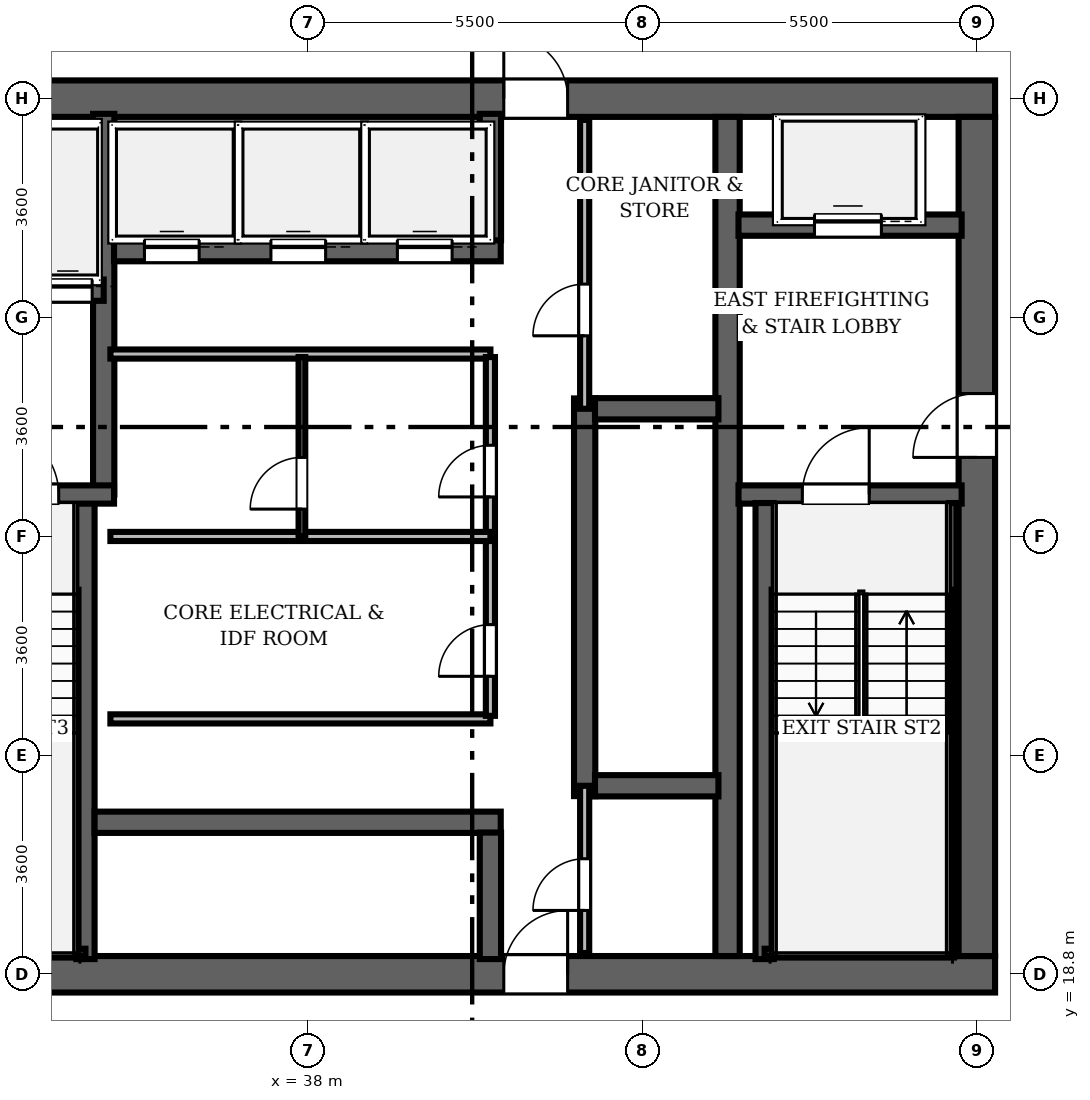
"""IFC4 building model, lengths in metres.
Left out: names, types, materials, properties, quantities, classifications, styles, units other than length and angle.
Written with IfcOpenShell. Run it as: python <this file> out.ifc"""

import sys

from ifc_helpers import new_model, si_unit, direction, frame, frame_2d, origin, place, context, subcontext, project, spatial, rectangle, extrude, element, fill, save


model = new_model("IFC4")
c1 = context("Model", 3, precision=1e-05, world=origin(), true_north=direction((0.0, 1.0)))
c2 = subcontext(c1, "Body", "Model", "MODEL_VIEW")
j1 = project(units=[si_unit("LENGTHUNIT", "METRE"), si_unit("PLANEANGLEUNIT", "RADIAN")], contexts=[c1])
p1 = place(None, origin())
s1 = spatial("IfcSite", under=j1, at=p1, CompositionType="ELEMENT")
p2 = place(p1, origin())
s2 = spatial("IfcBuilding", under=s1, at=p2, CompositionType="ELEMENT")
p3 = place(p2, frame((0.0, 0.0, 35.4)))
s3 = spatial("IfcBuildingStorey", under=s2, at=p3, CompositionType="ELEMENT", Elevation=35.4)
p4 = place(p3, frame((26.7, 18.8, 0.0), z_axis=(0.0, 0.0, 1.0), x_axis=(1.0, 0.0, 0.0)))
e1 = element("IfcWall", 1, at=p4, inside=s3, PredefinedType="SHEAR", context=c2, shape_type="SweptSolid", body=[
    extrude(rectangle(XDim=22.6, YDim=0.6, at=frame_2d((11.3, 0.0))), origin(), (0.0, 0.0, 1.0), 6.0),
])
p5 = place(p4, frame((14.52, 0.0, 0.0)))
e2 = element("IfcOpeningElement", 2, at=p5, cuts=e1, PredefinedType="OPENING", context=c2, shape_type="SweptSolid", body=[
    extrude(rectangle(XDim=1.05, YDim=2.15, at=frame_2d((0.525, 1.075))), frame((0.0, 0.31, 0.0), z_axis=(0.0, -1.0, 0.0), x_axis=(1.0, 0.0, 0.0)), (0.0, 0.0, 1.0), 0.62),
])
p6 = place(p3, frame((26.7, 33.2, 0.0), z_axis=(0.0, 0.0, 1.0), x_axis=(1.0, 0.0, 0.0)))
e3 = element("IfcWall", 3, at=p6, inside=s3, PredefinedType="SHEAR", context=c2, shape_type="SweptSolid", body=[
    extrude(rectangle(XDim=22.6, YDim=0.6, at=frame_2d((11.3, 0.0))), origin(), (0.0, 0.0, 1.0), 6.0),
])
p7 = place(p6, frame((4.62, 0.0, 0.0)))
e4 = element("IfcOpeningElement", 4, at=p7, cuts=e3, PredefinedType="OPENING", context=c2, shape_type="SweptSolid", body=[
    extrude(rectangle(XDim=1.05, YDim=2.15, at=frame_2d((0.525, 1.075))), frame((0.0, 0.31, 0.0), z_axis=(0.0, -1.0, 0.0), x_axis=(1.0, 0.0, 0.0)), (0.0, 0.0, 1.0), 0.62),
])
p8 = place(p6, frame((14.52, 0.0, 0.0)))
e5 = element("IfcOpeningElement", 5, at=p8, cuts=e3, PredefinedType="OPENING", context=c2, shape_type="SweptSolid", body=[
    extrude(rectangle(XDim=1.05, YDim=2.15, at=frame_2d((0.525, 1.075))), frame((0.0, 0.31, 0.0), z_axis=(0.0, -1.0, 0.0), x_axis=(1.0, 0.0, 0.0)), (0.0, 0.0, 1.0), 0.62),
])
p9 = place(p3, frame((49.0, 19.1, 0.0), z_axis=(0.0, 0.0, 1.0), x_axis=(0.0, 1.0, 0.0)))
e6 = element("IfcWall", 6, at=p9, inside=s3, PredefinedType="SHEAR", context=c2, shape_type="SweptSolid", body=[
    extrude(rectangle(XDim=13.8, YDim=0.6, at=frame_2d((6.9, 0.0))), origin(), (0.0, 0.0, 1.0), 6.0),
])
p10 = place(p9, frame((8.2, 0.0, 0.0)))
e7 = element("IfcOpeningElement", 7, at=p10, cuts=e6, PredefinedType="OPENING", context=c2, shape_type="SweptSolid", body=[
    extrude(rectangle(XDim=1.05, YDim=2.15, at=frame_2d((0.525, 1.075))), frame((0.0, 0.31, 0.0), z_axis=(0.0, -1.0, 0.0), x_axis=(1.0, 0.0, 0.0)), (0.0, 0.0, 1.0), 0.62),
])
p11 = place(p3, frame((44.9, 19.1, 0.0), z_axis=(0.0, 0.0, 1.0), x_axis=(0.0, 1.0, 0.0)))
e8 = element("IfcWall", 8, at=p11, inside=s3, PredefinedType="SHEAR", context=c2, shape_type="SweptSolid", body=[
    extrude(rectangle(XDim=13.8, YDim=0.4, at=frame_2d((6.9, 0.0))), origin(), (0.0, 0.0, 1.0), 6.0),
])
p12 = place(p3, frame((45.08, 26.69, 0.0), z_axis=(0.0, 0.0, 1.0), x_axis=(1.0, 0.0, 0.0)))
e9 = element("IfcWall", 9, at=p12, inside=s3, PredefinedType="SHEAR", context=c2, shape_type="SweptSolid", body=[
    extrude(rectangle(XDim=3.67, YDim=0.3, at=frame_2d((1.835, 0.0))), origin(), (0.0, 0.0, 1.0), 6.0),
])
p13 = place(p12, frame((1.05, 0.0, 0.0)))
e10 = element("IfcOpeningElement", 10, at=p13, cuts=e9, PredefinedType="OPENING", context=c2, shape_type="SweptSolid", body=[
    extrude(rectangle(XDim=1.1, YDim=2.15, at=frame_2d((0.55, 1.075))), frame((0.0, 0.16, 0.0), z_axis=(0.0, -1.0, 0.0), x_axis=(1.0, 0.0, 0.0)), (0.0, 0.0, 1.0), 0.32),
])
p14 = place(p3, frame((45.51, 19.05, 0.0), z_axis=(0.0, 0.0, 1.0), x_axis=(0.0, 1.0, 0.0)))
e11 = element("IfcWall", 11, at=p14, inside=s3, PredefinedType="SHEAR", context=c2, shape_type="SweptSolid", body=[
    extrude(rectangle(XDim=7.5, YDim=0.3, at=frame_2d((3.75, 0.0))), origin(), (0.0, 0.0, 1.0), 6.0),
])
p15 = place(p3, frame((48.605, 19.1, 0.0), z_axis=(0.0, 0.0, 1.0), x_axis=(0.0, 1.0, 0.0)))
e12 = element("IfcWall", 12, at=p15, inside=s3, PredefinedType="SHEAR", context=c2, shape_type="SweptSolid", body=[
    extrude(rectangle(XDim=7.45, YDim=0.12, at=frame_2d((3.725, 0.0))), origin(), (0.0, 0.0, 1.0), 6.0),
])
p16 = place(p3, frame((45.51, 19.16, 0.0), z_axis=(0.0, 0.0, 1.0), x_axis=(1.0, 0.0, 0.0)))
e13 = element("IfcWall", 13, at=p16, inside=s3, PredefinedType="SHEAR", context=c2, shape_type="SweptSolid", body=[
    extrude(rectangle(XDim=3.095, YDim=0.12, at=frame_2d((1.547, 0.0))), origin(), (0.0, 0.0, 1.0), 6.0),
])
p17 = place(p3, frame((45.08, 31.12, 0.0), z_axis=(0.0, 0.0, 1.0), x_axis=(1.0, 0.0, 0.0)))
e14 = element("IfcWall", 14, at=p17, inside=s3, PredefinedType="SHEAR", context=c2, shape_type="SweptSolid", body=[
    extrude(rectangle(XDim=3.67, YDim=0.35, at=frame_2d((1.835, 0.0))), origin(), (0.0, 0.0, 1.0), 4.81),
])
p18 = place(p17, frame((1.25, 0.0, 0.0)))
e15 = element("IfcOpeningElement", 15, at=p18, cuts=e14, PredefinedType="OPENING", context=c2, shape_type="SweptSolid", body=[
    extrude(rectangle(XDim=1.1, YDim=2.15, at=frame_2d((0.55, 1.075))), frame((0.0, 0.185, 0.0), z_axis=(0.0, -1.0, 0.0), x_axis=(1.0, 0.0, 0.0)), (0.0, 0.0, 1.0), 0.37),
])
p19 = place(p3, frame((34.34, 19.05, 0.0), z_axis=(0.0, 0.0, 1.0), x_axis=(0.0, 1.0, 0.0)))
e16 = element("IfcWall", 16, at=p19, inside=s3, PredefinedType="SHEAR", context=c2, shape_type="SweptSolid", body=[
    extrude(rectangle(XDim=7.5, YDim=0.3, at=frame_2d((3.75, 0.0))), origin(), (0.0, 0.0, 1.0), 6.0),
])
p20 = place(p3, frame((34.64, 26.69, 0.0), z_axis=(0.0, 0.0, 1.0), x_axis=(0.0, 1.0, 0.0)))
e17 = element("IfcWall", 17, at=p20, inside=s3, PredefinedType="SHEAR", context=c2, shape_type="SweptSolid", body=[
    extrude(rectangle(XDim=6.26, YDim=0.35, at=frame_2d((3.13, 0.0))), origin(), (0.0, 0.0, 1.0), 6.0),
])
p21 = place(p3, frame((31.25, 26.69, 0.0), z_axis=(0.0, 0.0, 1.0), x_axis=(1.0, 0.0, 0.0)))
e18 = element("IfcWall", 18, at=p21, inside=s3, PredefinedType="SHEAR", context=c2, shape_type="SweptSolid", body=[
    extrude(rectangle(XDim=3.56, YDim=0.3, at=frame_2d((1.78, 0.0))), origin(), (0.0, 0.0, 1.0), 6.0),
])
p22 = place(p21, frame((1.55, 0.0, 0.0)))
e19 = element("IfcOpeningElement", 19, at=p22, cuts=e18, PredefinedType="OPENING", context=c2, shape_type="SweptSolid", body=[
    extrude(rectangle(XDim=1.1, YDim=2.15, at=frame_2d((0.55, 1.075))), frame((0.0, 0.16, 0.0), z_axis=(0.0, -1.0, 0.0), x_axis=(1.0, 0.0, 0.0)), (0.0, 0.0, 1.0), 0.32),
])
p23 = place(p3, frame((31.3, 19.16, 0.0), z_axis=(0.0, 0.0, 1.0), x_axis=(1.0, 0.0, 0.0)))
e20 = element("IfcWall", 20, at=p23, inside=s3, PredefinedType="SHEAR", context=c2, shape_type="SweptSolid", body=[
    extrude(rectangle(XDim=3.04, YDim=0.12, at=frame_2d((1.52, 0.0))), origin(), (0.0, 0.0, 1.0), 6.0),
])
p24 = place(p3, frame((32.23, 30.05, 0.0), z_axis=(0.0, 0.0, 1.0), x_axis=(1.0, 0.0, 0.0)))
e21 = element("IfcWall", 21, at=p24, inside=s3, PredefinedType="SHEAR", context=c2, shape_type="SweptSolid", body=[
    extrude(rectangle(XDim=2.41, YDim=0.35, at=frame_2d((1.205, 0.0))), origin(), (0.0, 0.0, 1.0), 4.81),
])
p25 = place(p24, frame((0.42, 0.0, 0.0)))
e22 = element("IfcOpeningElement", 22, at=p25, cuts=e21, PredefinedType="OPENING", context=c2, shape_type="SweptSolid", body=[
    extrude(rectangle(XDim=0.8, YDim=2.15, at=frame_2d((0.4, 1.075))), frame((0.0, 0.185, 0.0), z_axis=(0.0, -1.0, 0.0), x_axis=(1.0, 0.0, 0.0)), (0.0, 0.0, 1.0), 0.37),
])
p26 = place(p24, frame((1.42, 0.0, 0.0)))
e23 = element("IfcOpeningElement", 23, at=p26, cuts=e21, PredefinedType="OPENING", context=c2, shape_type="SweptSolid", body=[
    extrude(rectangle(XDim=0.8, YDim=2.15, at=frame_2d((0.4, 1.075))), frame((0.0, 0.185, 0.0), z_axis=(0.0, -1.0, 0.0), x_axis=(1.0, 0.0, 0.0)), (0.0, 0.0, 1.0), 0.37),
])
p27 = place(p3, frame((42.55, 21.73, 0.0), z_axis=(0.0, 0.0, 1.0), x_axis=(0.0, 1.0, 0.0)))
e24 = element("IfcWall", 24, at=p27, inside=s3, PredefinedType="SHEAR", context=c2, shape_type="SweptSolid", body=[
    extrude(rectangle(XDim=6.54, YDim=0.35, at=frame_2d((3.27, 0.0))), origin(), (0.0, 0.0, 1.0), 4.81),
])
for number, where, z_axis, x_axis in (
    (25, (42.72, 21.9, 0.0), (0.0, 0.0, 1.0), (1.0, 0.0, 0.0)),
    (26, (42.72, 28.1, 0.0), (0.0, 0.0, 1.0), (1.0, 0.0, 0.0)),
):
    element("IfcWall", number, at=place(p3, frame(where, z_axis=z_axis, x_axis=x_axis)), inside=s3, PredefinedType="SHEAR", context=c2, shape_type="SweptSolid", body=[
        extrude(rectangle(XDim=2.03, YDim=0.35, at=frame_2d((1.015, 0.0))), origin(), (0.0, 0.0, 1.0), 4.81),
    ])
p28 = place(p3, frame((34.81, 30.7, 0.0), z_axis=(0.0, 0.0, 1.0), x_axis=(1.0, 0.0, 0.0)))
e27 = element("IfcWall", 27, at=p28, inside=s3, PredefinedType="SHEAR", context=c2, shape_type="SweptSolid", body=[
    extrude(rectangle(XDim=6.36, YDim=0.35, at=frame_2d((3.18, 0.0))), origin(), (0.0, 0.0, 1.0), 4.81),
])
p29 = place(p28, frame((0.5, 0.0, 0.0)))
e28 = element("IfcOpeningElement", 28, at=p29, cuts=e27, PredefinedType="OPENING", context=c2, shape_type="SweptSolid", body=[
    extrude(rectangle(XDim=0.9, YDim=2.15, at=frame_2d((0.45, 1.075))), frame((0.0, 0.185, 0.0), z_axis=(0.0, -1.0, 0.0), x_axis=(1.0, 0.0, 0.0)), (0.0, 0.0, 1.0), 0.37),
])
p30 = place(p28, frame((2.58, 0.0, 0.0)))
e29 = element("IfcOpeningElement", 29, at=p30, cuts=e27, PredefinedType="OPENING", context=c2, shape_type="SweptSolid", body=[
    extrude(rectangle(XDim=0.9, YDim=2.15, at=frame_2d((0.45, 1.075))), frame((0.0, 0.185, 0.0), z_axis=(0.0, -1.0, 0.0), x_axis=(1.0, 0.0, 0.0)), (0.0, 0.0, 1.0), 0.37),
])
p31 = place(p28, frame((4.66, 0.0, 0.0)))
e30 = element("IfcOpeningElement", 30, at=p31, cuts=e27, PredefinedType="OPENING", context=c2, shape_type="SweptSolid", body=[
    extrude(rectangle(XDim=0.9, YDim=2.15, at=frame_2d((0.45, 1.075))), frame((0.0, 0.185, 0.0), z_axis=(0.0, -1.0, 0.0), x_axis=(1.0, 0.0, 0.0)), (0.0, 0.0, 1.0), 0.37),
])
p32 = place(p3, frame((41.0, 30.87, 0.0), z_axis=(0.0, 0.0, 1.0), x_axis=(0.0, 1.0, 0.0)))
e31 = element("IfcWall", 31, at=p32, inside=s3, PredefinedType="SHEAR", context=c2, shape_type="SweptSolid", body=[
    extrude(rectangle(XDim=2.08, YDim=0.35, at=frame_2d((1.04, 0.0))), origin(), (0.0, 0.0, 1.0), 4.81),
])
p33 = place(p3, frame((34.49, 21.3, 0.0), z_axis=(0.0, 0.0, 1.0), x_axis=(1.0, 0.0, 0.0)))
e32 = element("IfcWall", 32, at=p33, inside=s3, PredefinedType="SHEAR", context=c2, shape_type="SweptSolid", body=[
    extrude(rectangle(XDim=6.68, YDim=0.35, at=frame_2d((3.34, 0.0))), origin(), (0.0, 0.0, 1.0), 4.81),
])
p34 = place(p3, frame((41.0, 19.05, 0.0), z_axis=(0.0, 0.0, 1.0), x_axis=(0.0, 1.0, 0.0)))
e33 = element("IfcWall", 33, at=p34, inside=s3, PredefinedType="SHEAR", context=c2, shape_type="SweptSolid", body=[
    extrude(rectangle(XDim=2.08, YDim=0.35, at=frame_2d((1.04, 0.0))), origin(), (0.0, 0.0, 1.0), 4.81),
])
for number, where, z_axis, x_axis in (
    (34, (34.75, 29.0, 0.0), (0.0, 0.0, 1.0), (1.0, 0.0, 0.0)),
    (35, (34.75, 23.0, 0.0), (0.0, 0.0, 1.0), (1.0, 0.0, 0.0)),
):
    element("IfcWall", number, at=place(p3, frame(where, z_axis=z_axis, x_axis=x_axis)), inside=s3, PredefinedType="PARTITIONING", context=c2, shape_type="SweptSolid", body=[
        extrude(rectangle(XDim=6.25, YDim=0.15, at=frame_2d((3.125, 0.0))), origin(), (0.0, 0.0, 1.0), 4.81),
    ])
p35 = place(p3, frame((41.0, 23.05, 0.0), z_axis=(0.0, 0.0, 1.0), x_axis=(0.0, 1.0, 0.0)))
e36 = element("IfcWall", 36, at=p35, inside=s3, PredefinedType="PARTITIONING", context=c2, shape_type="SweptSolid", body=[
    extrude(rectangle(XDim=5.9, YDim=0.15, at=frame_2d((2.95, 0.0))), origin(), (0.0, 0.0, 1.0), 4.81),
])
p36 = place(p35, frame((0.65, 0.0, 0.0)))
e37 = element("IfcOpeningElement", 37, at=p36, cuts=e36, PredefinedType="OPENING", context=c2, shape_type="SweptSolid", body=[
    extrude(rectangle(XDim=0.85, YDim=2.1, at=frame_2d((0.425, 1.05))), frame((0.0, 0.085, 0.0), z_axis=(0.0, -1.0, 0.0), x_axis=(1.0, 0.0, 0.0)), (0.0, 0.0, 1.0), 0.17),
])
p37 = place(p35, frame((3.6, 0.0, 0.0)))
e38 = element("IfcOpeningElement", 38, at=p37, cuts=e36, PredefinedType="OPENING", context=c2, shape_type="SweptSolid", body=[
    extrude(rectangle(XDim=0.85, YDim=2.1, at=frame_2d((0.425, 1.05))), frame((0.0, 0.085, 0.0), z_axis=(0.0, -1.0, 0.0), x_axis=(1.0, 0.0, 0.0)), (0.0, 0.0, 1.0), 0.17),
])
p38 = place(p3, frame((34.75, 26.0, 0.0), z_axis=(0.0, 0.0, 1.0), x_axis=(1.0, 0.0, 0.0)))
e39 = element("IfcWall", 39, at=p38, inside=s3, PredefinedType="PARTITIONING", context=c2, shape_type="SweptSolid", body=[
    extrude(rectangle(XDim=6.25, YDim=0.15, at=frame_2d((3.125, 0.0))), origin(), (0.0, 0.0, 1.0), 4.81),
])
p39 = place(p3, frame((37.9, 26.0, 0.0), z_axis=(0.0, 0.0, 1.0), x_axis=(0.0, 1.0, 0.0)))
e40 = element("IfcWall", 40, at=p39, inside=s3, PredefinedType="PARTITIONING", context=c2, shape_type="SweptSolid", body=[
    extrude(rectangle(XDim=2.95, YDim=0.11, at=frame_2d((1.475, 0.0))), origin(), (0.0, 0.0, 1.0), 4.81),
])
p40 = place(p39, frame((0.45, 0.0, 0.0)))
e41 = element("IfcOpeningElement", 41, at=p40, cuts=e40, PredefinedType="OPENING", context=c2, shape_type="SweptSolid", body=[
    extrude(rectangle(XDim=0.85, YDim=2.1, at=frame_2d((0.425, 1.05))), frame((0.0, 0.065, 0.0), z_axis=(0.0, -1.0, 0.0), x_axis=(1.0, 0.0, 0.0)), (0.0, 0.0, 1.0), 0.13),
])
p41 = place(p3, frame((42.55, 28.1, 0.0), z_axis=(0.0, 0.0, 1.0), x_axis=(0.0, 1.0, 0.0)))
e42 = element("IfcWall", 42, at=p41, inside=s3, PredefinedType="PARTITIONING", context=c2, shape_type="SweptSolid", body=[
    extrude(rectangle(XDim=4.75, YDim=0.15, at=frame_2d((2.375, 0.0))), origin(), (0.0, 0.0, 1.0), 4.81),
])
p42 = place(p41, frame((1.2, 0.0, 0.0)))
e43 = element("IfcOpeningElement", 43, at=p42, cuts=e42, PredefinedType="OPENING", context=c2, shape_type="SweptSolid", body=[
    extrude(rectangle(XDim=0.85, YDim=2.1, at=frame_2d((0.425, 1.05))), frame((0.0, 0.085, 0.0), z_axis=(0.0, -1.0, 0.0), x_axis=(1.0, 0.0, 0.0)), (0.0, 0.0, 1.0), 0.17),
])
p43 = place(p3, frame((42.55, 19.15, 0.0), z_axis=(0.0, 0.0, 1.0), x_axis=(0.0, 1.0, 0.0)))
e44 = element("IfcWall", 44, at=p43, inside=s3, PredefinedType="PARTITIONING", context=c2, shape_type="SweptSolid", body=[
    extrude(rectangle(XDim=2.75, YDim=0.15, at=frame_2d((1.375, 0.0))), origin(), (0.0, 0.0, 1.0), 4.81),
])
p44 = place(p43, frame((0.7, 0.0, 0.0)))
e45 = element("IfcOpeningElement", 45, at=p44, cuts=e44, PredefinedType="OPENING", context=c2, shape_type="SweptSolid", body=[
    extrude(rectangle(XDim=0.85, YDim=2.1, at=frame_2d((0.425, 1.05))), frame((0.0, 0.085, 0.0), z_axis=(0.0, -1.0, 0.0), x_axis=(1.0, 0.0, 0.0)), (0.0, 0.0, 1.0), 0.17),
])
p45 = place(p13, origin())
e46 = element("IfcDoor", 46, at=p45, inside=s3, OperationType="SINGLE_SWING_RIGHT", PredefinedType="DOOR", context=c2, shape_type="SweptSolid", body=[
    extrude(rectangle(XDim=1.1, YDim=2.15, at=frame_2d((0.55, 1.075))), frame((0.0, 0.025, 0.0), z_axis=(0.0, -1.0, 0.0), x_axis=(1.0, 0.0, 0.0)), (0.0, 0.0, 1.0), 0.05),
])
fill(e10, e46)
p46 = place(p10, origin())
e47 = element("IfcDoor", 47, at=p46, inside=s3, OperationType="SINGLE_SWING_LEFT", PredefinedType="DOOR", context=c2, shape_type="SweptSolid", body=[
    extrude(rectangle(XDim=1.05, YDim=2.15, at=frame_2d((0.525, 1.075))), frame((0.0, 0.025, 0.0), z_axis=(0.0, -1.0, 0.0), x_axis=(1.0, 0.0, 0.0)), (0.0, 0.0, 1.0), 0.05),
])
fill(e7, e47)
p47 = place(p22, origin())
e48 = element("IfcDoor", 48, at=p47, inside=s3, OperationType="SINGLE_SWING_LEFT", PredefinedType="DOOR", context=c2, shape_type="SweptSolid", body=[
    extrude(rectangle(XDim=1.1, YDim=2.15, at=frame_2d((0.55, 1.075))), frame((0.0, 0.025, 0.0), z_axis=(0.0, -1.0, 0.0), x_axis=(1.0, 0.0, 0.0)), (0.0, 0.0, 1.0), 0.05),
])
fill(e19, e48)
p48 = place(p8, origin())
e49 = element("IfcDoor", 49, at=p48, inside=s3, OperationType="SINGLE_SWING_LEFT", PredefinedType="DOOR", context=c2, shape_type="SweptSolid", body=[
    extrude(rectangle(XDim=1.05, YDim=2.15, at=frame_2d((0.525, 1.075))), frame((0.0, 0.025, 0.0), z_axis=(0.0, -1.0, 0.0), x_axis=(1.0, 0.0, 0.0)), (0.0, 0.0, 1.0), 0.05),
])
fill(e5, e49)
p49 = place(p5, origin())
e50 = element("IfcDoor", 50, at=p49, inside=s3, OperationType="SINGLE_SWING_RIGHT", PredefinedType="DOOR", context=c2, shape_type="SweptSolid", body=[
    extrude(rectangle(XDim=1.05, YDim=2.15, at=frame_2d((0.525, 1.075))), frame((0.0, 0.025, 0.0), z_axis=(0.0, -1.0, 0.0), x_axis=(1.0, 0.0, 0.0)), (0.0, 0.0, 1.0), 0.05),
])
fill(e2, e50)
p50 = place(p36, origin())
e51 = element("IfcDoor", 51, at=p50, inside=s3, OperationType="SINGLE_SWING_LEFT", PredefinedType="DOOR", context=c2, shape_type="SweptSolid", body=[
    extrude(rectangle(XDim=0.85, YDim=2.1, at=frame_2d((0.425, 1.05))), frame((0.0, 0.025, 0.0), z_axis=(0.0, -1.0, 0.0), x_axis=(1.0, 0.0, 0.0)), (0.0, 0.0, 1.0), 0.05),
])
fill(e37, e51)
p51 = place(p37, origin())
e52 = element("IfcDoor", 52, at=p51, inside=s3, OperationType="SINGLE_SWING_LEFT", PredefinedType="DOOR", context=c2, shape_type="SweptSolid", body=[
    extrude(rectangle(XDim=0.85, YDim=2.1, at=frame_2d((0.425, 1.05))), frame((0.0, 0.025, 0.0), z_axis=(0.0, -1.0, 0.0), x_axis=(1.0, 0.0, 0.0)), (0.0, 0.0, 1.0), 0.05),
])
fill(e38, e52)
p52 = place(p40, origin())
e53 = element("IfcDoor", 53, at=p52, inside=s3, OperationType="SINGLE_SWING_LEFT", PredefinedType="DOOR", context=c2, shape_type="SweptSolid", body=[
    extrude(rectangle(XDim=0.85, YDim=2.1, at=frame_2d((0.425, 1.05))), frame((0.0, 0.025, 0.0), z_axis=(0.0, -1.0, 0.0), x_axis=(1.0, 0.0, 0.0)), (0.0, 0.0, 1.0), 0.05),
])
fill(e41, e53)
p53 = place(p42, origin())
e54 = element("IfcDoor", 54, at=p53, inside=s3, OperationType="SINGLE_SWING_LEFT", PredefinedType="DOOR", context=c2, shape_type="SweptSolid", body=[
    extrude(rectangle(XDim=0.85, YDim=2.1, at=frame_2d((0.425, 1.05))), frame((0.0, 0.025, 0.0), z_axis=(0.0, -1.0, 0.0), x_axis=(1.0, 0.0, 0.0)), (0.0, 0.0, 1.0), 0.05),
])
fill(e43, e54)
p54 = place(p44, origin())
e55 = element("IfcDoor", 55, at=p54, inside=s3, OperationType="SINGLE_SWING_LEFT", PredefinedType="DOOR", context=c2, shape_type="SweptSolid", body=[
    extrude(rectangle(XDim=0.85, YDim=2.1, at=frame_2d((0.425, 1.05))), frame((0.0, 0.025, 0.0), z_axis=(0.0, -1.0, 0.0), x_axis=(1.0, 0.0, 0.0)), (0.0, 0.0, 1.0), 0.05),
])
fill(e45, e55)
p55 = place(p29, origin())
e56 = element("IfcDoor", 56, at=p55, inside=s3, OperationType="SLIDING_TO_LEFT", PredefinedType="DOOR", context=c2, shape_type="SweptSolid", body=[
    extrude(rectangle(XDim=0.9, YDim=2.15, at=frame_2d((0.45, 1.075))), frame((0.0, 0.025, 0.0), z_axis=(0.0, -1.0, 0.0), x_axis=(1.0, 0.0, 0.0)), (0.0, 0.0, 1.0), 0.05),
])
fill(e28, e56)
p56 = place(p30, origin())
e57 = element("IfcDoor", 57, at=p56, inside=s3, OperationType="SLIDING_TO_LEFT", PredefinedType="DOOR", context=c2, shape_type="SweptSolid", body=[
    extrude(rectangle(XDim=0.9, YDim=2.15, at=frame_2d((0.45, 1.075))), frame((0.0, 0.025, 0.0), z_axis=(0.0, -1.0, 0.0), x_axis=(1.0, 0.0, 0.0)), (0.0, 0.0, 1.0), 0.05),
])
fill(e29, e57)
p57 = place(p31, origin())
e58 = element("IfcDoor", 58, at=p57, inside=s3, OperationType="SLIDING_TO_LEFT", PredefinedType="DOOR", context=c2, shape_type="SweptSolid", body=[
    extrude(rectangle(XDim=0.9, YDim=2.15, at=frame_2d((0.45, 1.075))), frame((0.0, 0.025, 0.0), z_axis=(0.0, -1.0, 0.0), x_axis=(1.0, 0.0, 0.0)), (0.0, 0.0, 1.0), 0.05),
])
fill(e30, e58)
p58 = place(p18, origin())
e59 = element("IfcDoor", 59, at=p58, inside=s3, OperationType="SLIDING_TO_LEFT", PredefinedType="DOOR", context=c2, shape_type="SweptSolid", body=[
    extrude(rectangle(XDim=1.1, YDim=2.15, at=frame_2d((0.55, 1.075))), frame((0.0, 0.025, 0.0), z_axis=(0.0, -1.0, 0.0), x_axis=(1.0, 0.0, 0.0)), (0.0, 0.0, 1.0), 0.05),
])
fill(e15, e59)
p59 = place(p26, origin())
e60 = element("IfcDoor", 60, at=p59, inside=s3, OperationType="SLIDING_TO_LEFT", PredefinedType="DOOR", context=c2, shape_type="SweptSolid", body=[
    extrude(rectangle(XDim=0.8, YDim=2.15, at=frame_2d((0.4, 1.075))), frame((0.0, 0.025, 0.0), z_axis=(0.0, -1.0, 0.0), x_axis=(1.0, 0.0, 0.0)), (0.0, 0.0, 1.0), 0.05),
])
fill(e23, e60)
save(model, sys.argv[1])
